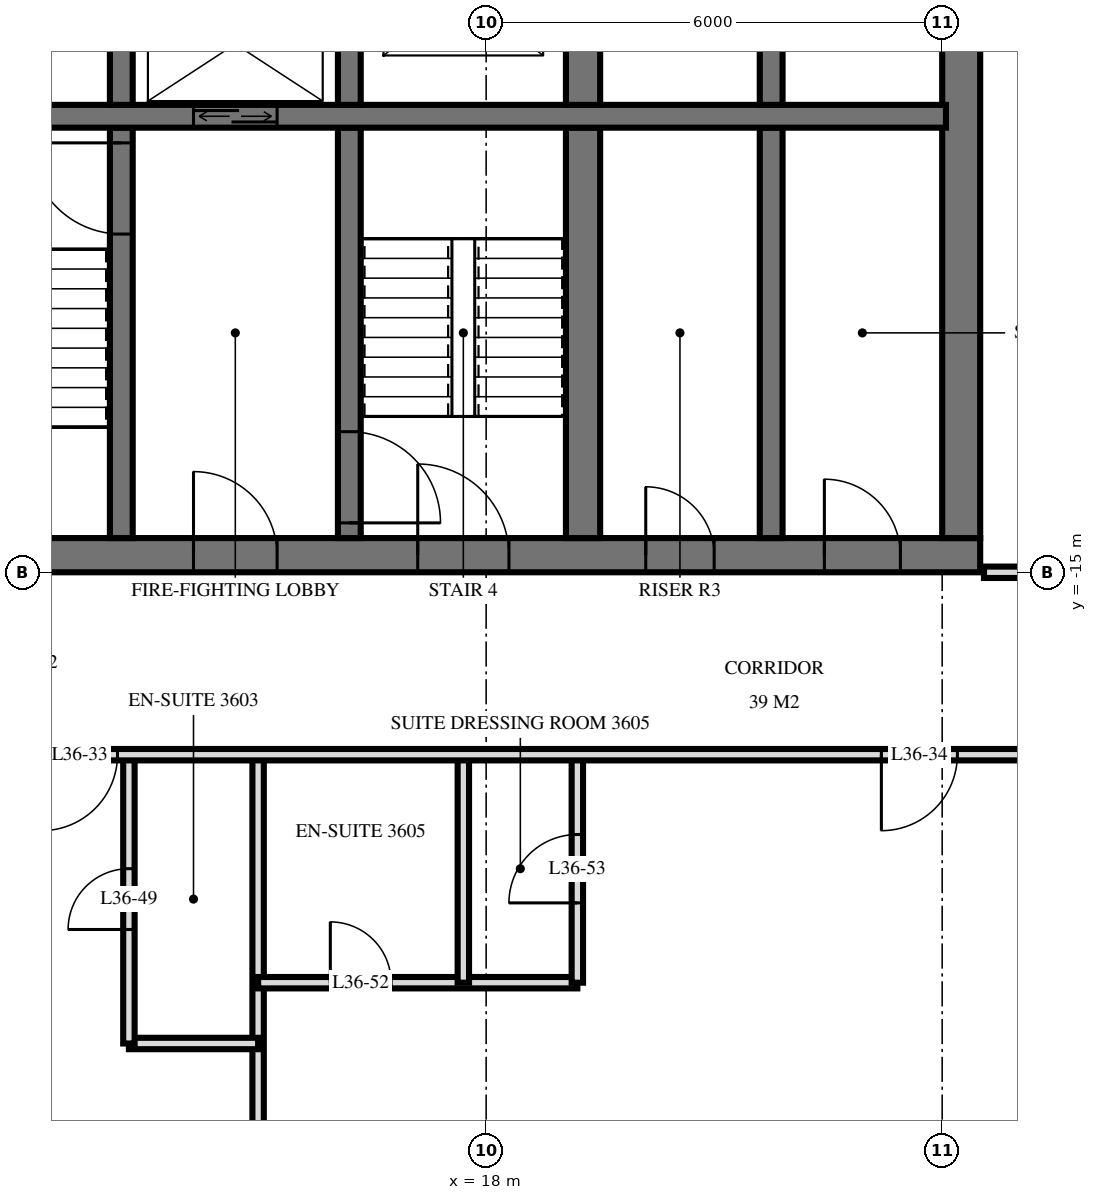
"""IFC4 building model, lengths in metres.
Left out: names, types, materials, properties, quantities, classifications, styles, units other than length and angle.
Written with IfcOpenShell. Run it as: python <this file> out.ifc"""

import sys

from ifc_helpers import new_model, si_unit, direction, frame, frame_2d, origin, place, context, subcontext, project, spatial, rectangle, extrude, element, fill, save


model = new_model("IFC4")
c1 = context("Model", 3, precision=1e-05, world=origin(), true_north=direction((0.0, 1.0)))
c2 = subcontext(c1, "Body", "Model", "MODEL_VIEW")
j1 = project(units=[si_unit("LENGTHUNIT", "METRE"), si_unit("PLANEANGLEUNIT", "RADIAN")], contexts=[c1])
p1 = place(None, origin())
s1 = spatial("IfcSite", under=j1, at=p1, CompositionType="ELEMENT")
p2 = place(p1, origin())
s2 = spatial("IfcBuilding", under=s1, at=p2, CompositionType="ELEMENT")
p3 = place(p2, frame((0.0, 0.0, 141.6)))
s3 = spatial("IfcBuildingStorey", under=s2, at=p3, CompositionType="ELEMENT", Elevation=141.6)
p4 = place(p3, frame((10.0, -14.775, 0.0), z_axis=(0.0, 0.0, 1.0), x_axis=(1.0, 0.0, 0.0)))
e1 = element("IfcWall", 1, at=p4, inside=s3, PredefinedType="SHEAR", context=c2, shape_type="SweptSolid", body=[
    extrude(rectangle(XDim=14.5, YDim=0.45, at=frame_2d((7.25, 0.0))), origin(), (0.0, 0.0, 1.0), 3.6),
])
p5 = place(p4, frame((7.1, 0.0, 0.0)))
e2 = element("IfcOpeningElement", 2, at=p5, cuts=e1, PredefinedType="OPENING", context=c2, shape_type="SweptSolid", body=[
    extrude(rectangle(XDim=1.2, YDim=2.1, at=frame_2d((0.6, 1.05))), frame((0.0, 0.235, 0.0), z_axis=(0.0, -1.0, 0.0), x_axis=(1.0, 0.0, 0.0)), (0.0, 0.0, 1.0), 0.47),
])
p6 = place(p4, frame((4.15, 0.0, 0.0)))
e3 = element("IfcOpeningElement", 3, at=p6, cuts=e1, PredefinedType="OPENING", context=c2, shape_type="SweptSolid", body=[
    extrude(rectangle(XDim=1.1, YDim=2.1, at=frame_2d((0.55, 1.05))), frame((0.0, 0.235, 0.0), z_axis=(0.0, -1.0, 0.0), x_axis=(1.0, 0.0, 0.0)), (0.0, 0.0, 1.0), 0.47),
])
p7 = place(p4, frame((10.1, 0.0, 0.0)))
e4 = element("IfcOpeningElement", 4, at=p7, cuts=e1, PredefinedType="OPENING", context=c2, shape_type="SweptSolid", body=[
    extrude(rectangle(XDim=0.9, YDim=2.1, at=frame_2d((0.45, 1.05))), frame((0.0, 0.235, 0.0), z_axis=(0.0, -1.0, 0.0), x_axis=(1.0, 0.0, 0.0)), (0.0, 0.0, 1.0), 0.47),
])
p8 = place(p4, frame((12.45, 0.0, 0.0)))
e5 = element("IfcOpeningElement", 5, at=p8, cuts=e1, PredefinedType="OPENING", context=c2, shape_type="SweptSolid", body=[
    extrude(rectangle(XDim=1.0, YDim=2.1, at=frame_2d((0.5, 1.05))), frame((0.0, 0.235, 0.0), z_axis=(0.0, -1.0, 0.0), x_axis=(1.0, 0.0, 0.0)), (0.0, 0.0, 1.0), 0.47),
])
p9 = place(p3, frame((24.25, -14.55, 0.0), z_axis=(0.0, 0.0, 1.0), x_axis=(0.0, 1.0, 0.0)))
e6 = element("IfcWall", 6, at=p9, inside=s3, PredefinedType="SHEAR", context=c2, shape_type="SweptSolid", body=[
    extrude(rectangle(XDim=14.1, YDim=0.5, at=frame_2d((7.05, 0.0))), origin(), (0.0, 0.0, 1.0), 3.6),
])
p10 = place(p3, frame((10.35, -9.0, 0.0), z_axis=(0.0, 0.0, 1.0), x_axis=(1.0, 0.0, 0.0)))
e7 = element("IfcWall", 7, at=p10, inside=s3, PredefinedType="SHEAR", context=c2, shape_type="SweptSolid", body=[
    extrude(rectangle(XDim=13.7, YDim=0.3, at=frame_2d((6.85, 0.0))), origin(), (0.0, 0.0, 1.0), 3.6),
])
p11 = place(p10, frame((3.8, 0.0, 0.0)))
e8 = element("IfcOpeningElement", 8, at=p11, cuts=e7, PredefinedType="OPENING", context=c2, shape_type="SweptSolid", body=[
    extrude(rectangle(XDim=1.1, YDim=2.1, at=frame_2d((0.55, 1.05))), frame((0.0, 0.16, 0.0), z_axis=(0.0, -1.0, 0.0), x_axis=(1.0, 0.0, 0.0)), (0.0, 0.0, 1.0), 0.32),
])
p12 = place(p3, frame((13.2, -8.85, 0.0), z_axis=(0.0, 0.0, 1.0), x_axis=(0.0, 1.0, 0.0)))
e9 = element("IfcWall", 9, at=p12, inside=s3, PredefinedType="SHEAR", context=c2, shape_type="SweptSolid", body=[
    extrude(rectangle(XDim=2.3, YDim=0.3, at=frame_2d((1.15, 0.0))), origin(), (0.0, 0.0, 1.0), 3.6),
])
p13 = place(p3, frame((13.2, -14.55, 0.0), z_axis=(0.0, 0.0, 1.0), x_axis=(0.0, 1.0, 0.0)))
e10 = element("IfcWall", 10, at=p13, inside=s3, PredefinedType="SHEAR", context=c2, shape_type="SweptSolid", body=[
    extrude(rectangle(XDim=5.4, YDim=0.3, at=frame_2d((2.7, 0.0))), origin(), (0.0, 0.0, 1.0), 3.6),
])
p14 = place(p13, frame((4.0, 0.0, 0.0)))
e11 = element("IfcOpeningElement", 11, at=p14, cuts=e10, PredefinedType="OPENING", context=c2, shape_type="SweptSolid", body=[
    extrude(rectangle(XDim=1.2, YDim=2.1, at=frame_2d((0.6, 1.05))), frame((0.0, 0.16, 0.0), z_axis=(0.0, -1.0, 0.0), x_axis=(1.0, 0.0, 0.0)), (0.0, 0.0, 1.0), 0.32),
])
p15 = place(p3, frame((16.2, -8.85, 0.0), z_axis=(0.0, 0.0, 1.0), x_axis=(0.0, 1.0, 0.0)))
e12 = element("IfcWall", 12, at=p15, inside=s3, PredefinedType="SHEAR", context=c2, shape_type="SweptSolid", body=[
    extrude(rectangle(XDim=2.3, YDim=0.3, at=frame_2d((1.15, 0.0))), origin(), (0.0, 0.0, 1.0), 3.6),
])
p16 = place(p3, frame((16.2, -14.55, 0.0), z_axis=(0.0, 0.0, 1.0), x_axis=(0.0, 1.0, 0.0)))
e13 = element("IfcWall", 13, at=p16, inside=s3, PredefinedType="SHEAR", context=c2, shape_type="SweptSolid", body=[
    extrude(rectangle(XDim=5.4, YDim=0.3, at=frame_2d((2.7, 0.0))), origin(), (0.0, 0.0, 1.0), 3.6),
])
p17 = place(p16, frame((0.2, 0.0, 0.0)))
e14 = element("IfcOpeningElement", 14, at=p17, cuts=e13, PredefinedType="OPENING", context=c2, shape_type="SweptSolid", body=[
    extrude(rectangle(XDim=1.2, YDim=2.1, at=frame_2d((0.6, 1.05))), frame((0.0, 0.16, 0.0), z_axis=(0.0, -1.0, 0.0), x_axis=(1.0, 0.0, 0.0)), (0.0, 0.0, 1.0), 0.32),
])
p18 = place(p3, frame((19.275, -8.85, 0.0), z_axis=(0.0, 0.0, 1.0), x_axis=(0.0, 1.0, 0.0)))
e15 = element("IfcWall", 15, at=p18, inside=s3, PredefinedType="SHEAR", context=c2, shape_type="SweptSolid", body=[
    extrude(rectangle(XDim=2.3, YDim=0.45, at=frame_2d((1.15, 0.0))), origin(), (0.0, 0.0, 1.0), 3.6),
])
p19 = place(p3, frame((19.275, -14.55, 0.0), z_axis=(0.0, 0.0, 1.0), x_axis=(0.0, 1.0, 0.0)))
e16 = element("IfcWall", 16, at=p19, inside=s3, PredefinedType="SHEAR", context=c2, shape_type="SweptSolid", body=[
    extrude(rectangle(XDim=5.4, YDim=0.45, at=frame_2d((2.7, 0.0))), origin(), (0.0, 0.0, 1.0), 3.6),
])
p20 = place(p3, frame((21.75, -8.85, 0.0), z_axis=(0.0, 0.0, 1.0), x_axis=(0.0, 1.0, 0.0)))
e17 = element("IfcWall", 17, at=p20, inside=s3, PredefinedType="SHEAR", context=c2, shape_type="SweptSolid", body=[
    extrude(rectangle(XDim=2.3, YDim=0.3, at=frame_2d((1.15, 0.0))), origin(), (0.0, 0.0, 1.0), 3.6),
])
p21 = place(p3, frame((21.75, -14.55, 0.0), z_axis=(0.0, 0.0, 1.0), x_axis=(0.0, 1.0, 0.0)))
e18 = element("IfcWall", 18, at=p21, inside=s3, PredefinedType="SHEAR", context=c2, shape_type="SweptSolid", body=[
    extrude(rectangle(XDim=5.4, YDim=0.3, at=frame_2d((2.7, 0.0))), origin(), (0.0, 0.0, 1.0), 3.6),
])
p22 = place(p3, frame((19.2, -20.4, 0.0), z_axis=(0.0, 0.0, 1.0), x_axis=(0.0, 1.0, 0.0)))
e19 = element("IfcWall", 19, at=p22, inside=s3, PredefinedType="PARTITIONING", context=c2, shape_type="SweptSolid", body=[
    extrude(rectangle(XDim=3.0, YDim=0.15, at=frame_2d((1.5, 0.0))), origin(), (0.0, 0.0, 1.0), 3.32),
])
p23 = place(p22, frame((1.05, 0.0, 0.0)))
e20 = element("IfcOpeningElement", 20, at=p23, cuts=e19, PredefinedType="OPENING", context=c2, shape_type="SweptSolid", body=[
    extrude(rectangle(XDim=0.9, YDim=2.1, at=frame_2d((0.45, 1.05))), frame((0.0, 0.085, 0.0), z_axis=(0.0, -1.0, 0.0), x_axis=(1.0, 0.0, 0.0)), (0.0, 0.0, 1.0), 0.17),
])
p24 = place(p3, frame((17.7, -20.4, 0.0), z_axis=(0.0, 0.0, 1.0), x_axis=(0.0, 1.0, 0.0)))
e21 = element("IfcWall", 21, at=p24, inside=s3, PredefinedType="PARTITIONING", context=c2, shape_type="SweptSolid", body=[
    extrude(rectangle(XDim=3.0, YDim=0.15, at=frame_2d((1.5, 0.0))), origin(), (0.0, 0.0, 1.0), 3.32),
])
p25 = place(p3, frame((15.0, -33.62, 0.0), z_axis=(0.0, 0.0, 1.0), x_axis=(0.0, 1.0, 0.0)))
e22 = element("IfcWall", 22, at=p25, inside=s3, PredefinedType="PARTITIONING", context=c2, shape_type="SweptSolid", body=[
    extrude(rectangle(XDim=16.22, YDim=0.15, at=frame_2d((8.11, 0.0))), origin(), (0.0, 0.0, 1.0), 3.32),
])
p26 = place(p3, frame((13.3, -21.2, 0.0), z_axis=(0.0, 0.0, 1.0), x_axis=(0.0, 1.0, 0.0)))
e23 = element("IfcWall", 23, at=p26, inside=s3, PredefinedType="PARTITIONING", context=c2, shape_type="SweptSolid", body=[
    extrude(rectangle(XDim=3.8, YDim=0.15, at=frame_2d((1.9, 0.0))), origin(), (0.0, 0.0, 1.0), 3.32),
])
p27 = place(p26, frame((1.5, 0.0, 0.0)))
e24 = element("IfcOpeningElement", 24, at=p27, cuts=e23, PredefinedType="OPENING", context=c2, shape_type="SweptSolid", body=[
    extrude(rectangle(XDim=0.8, YDim=2.1, at=frame_2d((0.4, 1.05))), frame((0.0, 0.085, 0.0), z_axis=(0.0, -1.0, 0.0), x_axis=(1.0, 0.0, 0.0)), (0.0, 0.0, 1.0), 0.17),
])
p28 = place(p3, frame((13.3, -21.2, 0.0), z_axis=(0.0, 0.0, 1.0), x_axis=(1.0, 0.0, 0.0)))
e25 = element("IfcWall", 25, at=p28, inside=s3, PredefinedType="PARTITIONING", context=c2, shape_type="SweptSolid", body=[
    extrude(rectangle(XDim=1.7, YDim=0.15, at=frame_2d((0.85, 0.0))), origin(), (0.0, 0.0, 1.0), 3.32),
])
p29 = place(p3, frame((15.0, -20.4, 0.0), z_axis=(0.0, 0.0, 1.0), x_axis=(1.0, 0.0, 0.0)))
e26 = element("IfcWall", 26, at=p29, inside=s3, PredefinedType="PARTITIONING", context=c2, shape_type="SweptSolid", body=[
    extrude(rectangle(XDim=4.2, YDim=0.15, at=frame_2d((2.1, 0.0))), origin(), (0.0, 0.0, 1.0), 3.32),
])
p30 = place(p29, frame((0.95, 0.0, 0.0)))
e27 = element("IfcOpeningElement", 27, at=p30, cuts=e26, PredefinedType="OPENING", context=c2, shape_type="SweptSolid", body=[
    extrude(rectangle(XDim=0.8, YDim=2.1, at=frame_2d((0.4, 1.05))), frame((0.0, 0.085, 0.0), z_axis=(0.0, -1.0, 0.0), x_axis=(1.0, 0.0, 0.0)), (0.0, 0.0, 1.0), 0.17),
])
p31 = place(p3, frame((-28.02, -17.4, 0.0), z_axis=(0.0, 0.0, 1.0), x_axis=(1.0, 0.0, 0.0)))
e28 = element("IfcWall", 28, at=p31, inside=s3, PredefinedType="PARTITIONING", context=c2, shape_type="SweptSolid", body=[
    extrude(rectangle(XDim=56.04, YDim=0.15, at=frame_2d((28.02, 0.0))), origin(), (0.0, 0.0, 1.0), 3.32),
])
p32 = place(p31, frame((13.17, 0.0, 0.0)))
e29 = element("IfcOpeningElement", 29, at=p32, cuts=e28, PredefinedType="OPENING", context=c2, shape_type="SweptSolid", body=[
    extrude(rectangle(XDim=1.0, YDim=2.1, at=frame_2d((0.5, 1.05))), frame((0.0, 0.085, 0.0), z_axis=(0.0, -1.0, 0.0), x_axis=(1.0, 0.0, 0.0)), (0.0, 0.0, 1.0), 0.17),
])
p33 = place(p31, frame((11.87, 0.0, 0.0)))
e30 = element("IfcOpeningElement", 30, at=p33, cuts=e28, PredefinedType="OPENING", context=c2, shape_type="SweptSolid", body=[
    extrude(rectangle(XDim=1.0, YDim=2.1, at=frame_2d((0.5, 1.05))), frame((0.0, 0.085, 0.0), z_axis=(0.0, -1.0, 0.0), x_axis=(1.0, 0.0, 0.0)), (0.0, 0.0, 1.0), 0.17),
])
p34 = place(p31, frame((2.32, 0.0, 0.0)))
e31 = element("IfcOpeningElement", 31, at=p34, cuts=e28, PredefinedType="OPENING", context=c2, shape_type="SweptSolid", body=[
    extrude(rectangle(XDim=1.0, YDim=2.1, at=frame_2d((0.5, 1.05))), frame((0.0, 0.085, 0.0), z_axis=(0.0, -1.0, 0.0), x_axis=(1.0, 0.0, 0.0)), (0.0, 0.0, 1.0), 0.17),
])
p35 = place(p31, frame((40.17, 0.0, 0.0)))
e32 = element("IfcOpeningElement", 32, at=p35, cuts=e28, PredefinedType="OPENING", context=c2, shape_type="SweptSolid", body=[
    extrude(rectangle(XDim=1.0, YDim=2.1, at=frame_2d((0.5, 1.05))), frame((0.0, 0.085, 0.0), z_axis=(0.0, -1.0, 0.0), x_axis=(1.0, 0.0, 0.0)), (0.0, 0.0, 1.0), 0.17),
])
p36 = place(p31, frame((51.22, 0.0, 0.0)))
e33 = element("IfcOpeningElement", 33, at=p36, cuts=e28, PredefinedType="OPENING", context=c2, shape_type="SweptSolid", body=[
    extrude(rectangle(XDim=1.0, YDim=2.1, at=frame_2d((0.5, 1.05))), frame((0.0, 0.085, 0.0), z_axis=(0.0, -1.0, 0.0), x_axis=(1.0, 0.0, 0.0)), (0.0, 0.0, 1.0), 0.17),
])
p37 = place(p31, frame((18.52, 0.0, 0.0)))
e34 = element("IfcOpeningElement", 34, at=p37, cuts=e28, PredefinedType="OPENING", context=c2, shape_type="SweptSolid", body=[
    extrude(rectangle(XDim=1.0, YDim=2.1, at=frame_2d((0.5, 1.05))), frame((0.0, 0.085, 0.0), z_axis=(0.0, -1.0, 0.0), x_axis=(1.0, 0.0, 0.0)), (0.0, 0.0, 1.0), 0.17),
])
p38 = place(p31, frame((26.02, 0.0, 0.0)))
e35 = element("IfcOpeningElement", 35, at=p38, cuts=e28, PredefinedType="OPENING", context=c2, shape_type="SweptSolid", body=[
    extrude(rectangle(XDim=1.0, YDim=2.1, at=frame_2d((0.5, 1.05))), frame((0.0, 0.085, 0.0), z_axis=(0.0, -1.0, 0.0), x_axis=(1.0, 0.0, 0.0)), (0.0, 0.0, 1.0), 0.17),
])
p39 = place(p31, frame((35.02, 0.0, 0.0)))
e36 = element("IfcOpeningElement", 36, at=p39, cuts=e28, PredefinedType="OPENING", context=c2, shape_type="SweptSolid", body=[
    extrude(rectangle(XDim=1.0, YDim=2.1, at=frame_2d((0.5, 1.05))), frame((0.0, 0.085, 0.0), z_axis=(0.0, -1.0, 0.0), x_axis=(1.0, 0.0, 0.0)), (0.0, 0.0, 1.0), 0.17),
])
p40 = place(p3, frame((24.55, -15.0, 0.0), z_axis=(0.0, 0.0, 1.0), x_axis=(1.0, 0.0, 0.0)))
e37 = element("IfcWall", 37, at=p40, inside=s3, PredefinedType="PARTITIONING", context=c2, shape_type="SweptSolid", body=[
    extrude(rectangle(XDim=3.47, YDim=0.15, at=frame_2d((1.735, 0.0))), origin(), (0.0, 0.0, 1.0), 3.32),
])
p41 = place(p40, frame((0.9, 0.0, 0.0)))
e38 = element("IfcOpeningElement", 38, at=p41, cuts=e37, PredefinedType="OPENING", context=c2, shape_type="SweptSolid", body=[
    extrude(rectangle(XDim=1.0, YDim=2.1, at=frame_2d((0.5, 1.05))), frame((0.0, 0.085, 0.0), z_axis=(0.0, -1.0, 0.0), x_axis=(1.0, 0.0, 0.0)), (0.0, 0.0, 1.0), 0.17),
])
p42 = place(p11, origin())
e39 = element("IfcDoor", 39, at=p42, inside=s3, OperationType="DOUBLE_DOOR_SLIDING", PredefinedType="USERDEFINED", context=c2, shape_type="SweptSolid", body=[
    extrude(rectangle(XDim=1.1, YDim=2.1, at=frame_2d((0.55, 1.05))), frame((0.0, 0.025, 0.0), z_axis=(0.0, -1.0, 0.0), x_axis=(1.0, 0.0, 0.0)), (0.0, 0.0, 1.0), 0.05),
])
fill(e8, e39)
p43 = place(p5, origin())
e40 = element("IfcDoor", 40, at=p43, inside=s3, OperationType="SINGLE_SWING_RIGHT", PredefinedType="DOOR", context=c2, shape_type="SweptSolid", body=[
    extrude(rectangle(XDim=1.2, YDim=2.1, at=frame_2d((0.6, 1.05))), frame((0.0, 0.025, 0.0), z_axis=(0.0, -1.0, 0.0), x_axis=(1.0, 0.0, 0.0)), (0.0, 0.0, 1.0), 0.05),
])
fill(e2, e40)
p44 = place(p6, origin())
e41 = element("IfcDoor", 41, at=p44, inside=s3, OperationType="SINGLE_SWING_RIGHT", PredefinedType="DOOR", context=c2, shape_type="SweptSolid", body=[
    extrude(rectangle(XDim=1.1, YDim=2.1, at=frame_2d((0.55, 1.05))), frame((0.0, 0.025, 0.0), z_axis=(0.0, -1.0, 0.0), x_axis=(1.0, 0.0, 0.0)), (0.0, 0.0, 1.0), 0.05),
])
fill(e3, e41)
p45 = place(p7, origin())
e42 = element("IfcDoor", 42, at=p45, inside=s3, OperationType="SINGLE_SWING_RIGHT", PredefinedType="DOOR", context=c2, shape_type="SweptSolid", body=[
    extrude(rectangle(XDim=0.9, YDim=2.1, at=frame_2d((0.45, 1.05))), frame((0.0, 0.025, 0.0), z_axis=(0.0, -1.0, 0.0), x_axis=(1.0, 0.0, 0.0)), (0.0, 0.0, 1.0), 0.05),
])
fill(e4, e42)
p46 = place(p8, origin())
e43 = element("IfcDoor", 43, at=p46, inside=s3, OperationType="SINGLE_SWING_RIGHT", PredefinedType="DOOR", context=c2, shape_type="SweptSolid", body=[
    extrude(rectangle(XDim=1.0, YDim=2.1, at=frame_2d((0.5, 1.05))), frame((0.0, 0.025, 0.0), z_axis=(0.0, -1.0, 0.0), x_axis=(1.0, 0.0, 0.0)), (0.0, 0.0, 1.0), 0.05),
])
fill(e5, e43)
p47 = place(p14, origin())
e44 = element("IfcDoor", 44, at=p47, inside=s3, OperationType="SINGLE_SWING_LEFT", PredefinedType="DOOR", context=c2, shape_type="SweptSolid", body=[
    extrude(rectangle(XDim=1.2, YDim=2.1, at=frame_2d((0.6, 1.05))), frame((0.0, 0.025, 0.0), z_axis=(0.0, -1.0, 0.0), x_axis=(1.0, 0.0, 0.0)), (0.0, 0.0, 1.0), 0.05),
])
fill(e11, e44)
p48 = place(p17, frame((0.6, 0.0, 0.0), z_axis=(0.0, 0.0, 1.0), x_axis=(-1.0, 0.0, 0.0)))
e45 = element("IfcDoor", 45, at=p48, inside=s3, OperationType="SINGLE_SWING_LEFT", PredefinedType="DOOR", context=c2, shape_type="SweptSolid", body=[
    extrude(rectangle(XDim=1.2, YDim=2.1, at=frame_2d((0.0, 1.05))), frame((0.0, -0.025, 0.0), z_axis=(0.0, 1.0, 0.0), x_axis=(-1.0, 0.0, 0.0)), (0.0, 0.0, 1.0), 0.05),
])
fill(e14, e45)
p49 = place(p35, frame((0.5, 0.0, 0.0), z_axis=(0.0, 0.0, 1.0), x_axis=(-1.0, 0.0, 0.0)))
e46 = element("IfcDoor", 46, at=p49, inside=s3, OperationType="SINGLE_SWING_LEFT", PredefinedType="DOOR", context=c2, shape_type="SweptSolid", body=[
    extrude(rectangle(XDim=1.0, YDim=2.1, at=frame_2d((0.0, 1.05))), frame((0.0, -0.025, 0.0), z_axis=(0.0, 1.0, 0.0), x_axis=(-1.0, 0.0, 0.0)), (0.0, 0.0, 1.0), 0.05),
])
fill(e32, e46)
p50 = place(p36, frame((0.5, 0.0, 0.0), z_axis=(0.0, 0.0, 1.0), x_axis=(-1.0, 0.0, 0.0)))
e47 = element("IfcDoor", 47, at=p50, inside=s3, OperationType="SINGLE_SWING_LEFT", PredefinedType="DOOR", context=c2, shape_type="SweptSolid", body=[
    extrude(rectangle(XDim=1.0, YDim=2.1, at=frame_2d((0.0, 1.05))), frame((0.0, -0.025, 0.0), z_axis=(0.0, 1.0, 0.0), x_axis=(-1.0, 0.0, 0.0)), (0.0, 0.0, 1.0), 0.05),
])
fill(e33, e47)
p51 = place(p27, origin())
e48 = element("IfcDoor", 48, at=p51, inside=s3, OperationType="SINGLE_SWING_RIGHT", PredefinedType="DOOR", context=c2, shape_type="SweptSolid", body=[
    extrude(rectangle(XDim=0.8, YDim=2.1, at=frame_2d((0.4, 1.05))), frame((0.0, 0.025, 0.0), z_axis=(0.0, -1.0, 0.0), x_axis=(1.0, 0.0, 0.0)), (0.0, 0.0, 1.0), 0.05),
])
fill(e24, e48)
p52 = place(p30, origin())
e49 = element("IfcDoor", 49, at=p52, inside=s3, OperationType="SINGLE_SWING_RIGHT", PredefinedType="DOOR", context=c2, shape_type="SweptSolid", body=[
    extrude(rectangle(XDim=0.8, YDim=2.1, at=frame_2d((0.4, 1.05))), frame((0.0, 0.025, 0.0), z_axis=(0.0, -1.0, 0.0), x_axis=(1.0, 0.0, 0.0)), (0.0, 0.0, 1.0), 0.05),
])
fill(e27, e49)
p53 = place(p23, origin())
e50 = element("IfcDoor", 50, at=p53, inside=s3, OperationType="SINGLE_SWING_RIGHT", PredefinedType="DOOR", context=c2, shape_type="SweptSolid", body=[
    extrude(rectangle(XDim=0.9, YDim=2.1, at=frame_2d((0.45, 1.05))), frame((0.0, 0.025, 0.0), z_axis=(0.0, -1.0, 0.0), x_axis=(1.0, 0.0, 0.0)), (0.0, 0.0, 1.0), 0.05),
])
fill(e20, e50)
save(model, sys.argv[1])
